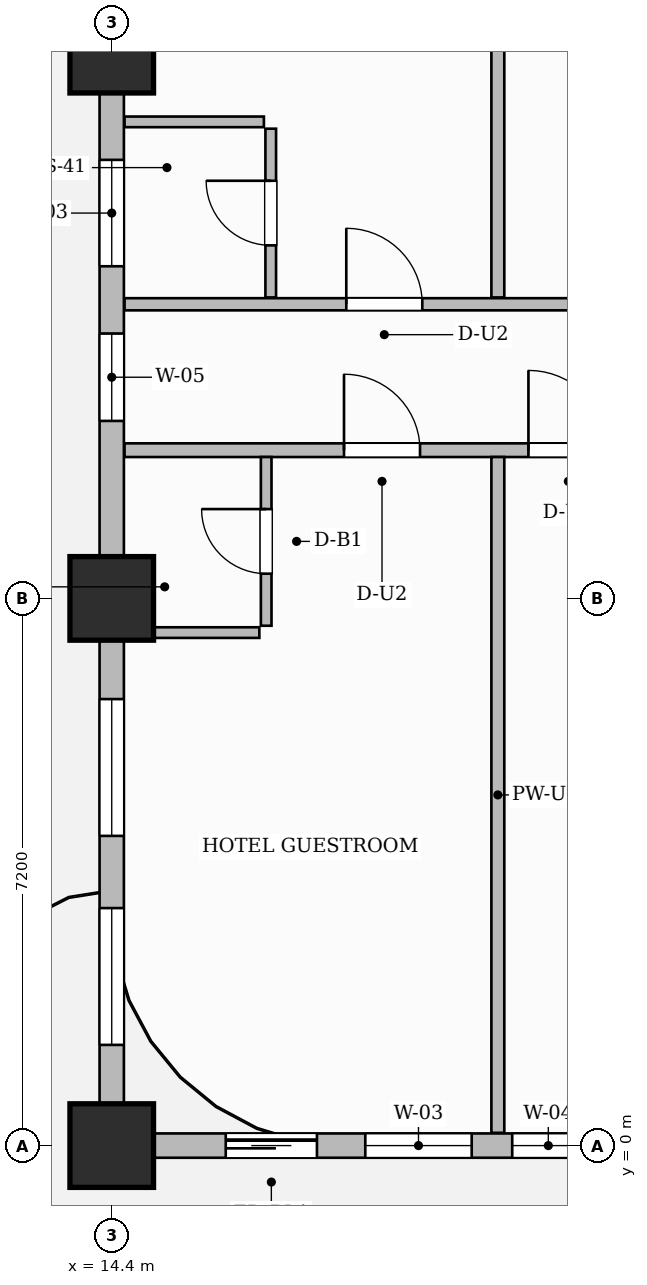
"""IFC4 building model, lengths in metres.
Left out: names, types, materials, properties, quantities, classifications, styles, units other than length and angle.
Written with IfcOpenShell. Run it as: python <this file> out.ifc"""

import sys

from ifc_helpers import new_model, si_unit, direction, frame, frame_2d, origin, origin_2d, place, context, subcontext, project, spatial, rectangle, extrude, source, transform, mapped, element, fill, save


model = new_model("IFC4")
c1 = context("Model", 3, precision=1e-05, world=origin(), true_north=direction((0.0, 1.0)))
c2 = subcontext(c1, "Body", "Model", "MODEL_VIEW")
j1 = project(units=[si_unit("LENGTHUNIT", "METRE"), si_unit("PLANEANGLEUNIT", "RADIAN")], contexts=[c1])
p1 = place(None, origin())
s1 = spatial("IfcSite", under=j1, at=p1, CompositionType="ELEMENT")
p2 = place(p1, origin())
s2 = spatial("IfcBuilding", under=s1, at=p2, CompositionType="ELEMENT")
p3 = place(p2, frame((0.0, 0.0, 32.4)))
s3 = spatial("IfcBuildingStorey", under=s2, at=p3, CompositionType="ELEMENT", Elevation=32.4)
m1 = source(origin(), c2, "Body", "SweptSolid", [
    extrude(rectangle(XDim=1.1, YDim=1.1, at=origin_2d()), origin(), (0.0, 0.0, 1.0), 3.7),
])
for number, where, z_axis, x_axis in (
    (1, (14.4, 0.0, 0.0), (0.0, 0.0, 1.0), (1.0, 0.0, 0.0)),
    (2, (14.4, 7.2, 0.0), (0.0, 0.0, 1.0), (1.0, 0.0, 0.0)),
    (3, (14.4, 14.4, 0.0), (0.0, 0.0, 1.0), (1.0, 0.0, 0.0)),
):
    element("IfcColumn", number, at=place(p3, frame(where, z_axis=z_axis, x_axis=x_axis)), inside=s3, PredefinedType="COLUMN", context=c2, shape_type="MappedRepresentation", body=[
        mapped(m1, transform((0.0, 0.0, 0.0), scale=1.0)),
    ])
p4 = place(p3, frame((14.568, 9.15, 0.0), z_axis=(0.0, 0.0, 1.0), x_axis=(1.0, 0.0, 0.0)))
e4 = element("IfcWall", 4, at=p4, inside=s3, PredefinedType="PARTITIONING", context=c2, shape_type="SweptSolid", body=[
    extrude(rectangle(XDim=15.542, YDim=0.18, at=frame_2d((7.771, 0.0))), origin(), (0.0, 0.0, 1.0), 3.45),
])
p5 = place(p4, frame((2.888, 0.0, 0.0)))
e5 = element("IfcOpeningElement", 5, at=p5, cuts=e4, PredefinedType="OPENING", context=c2, shape_type="SweptSolid", body=[
    extrude(rectangle(XDim=1.0, YDim=2.2, at=frame_2d((0.5, 1.1))), frame((0.0, 0.1, 0.0), z_axis=(0.0, -1.0, 0.0), x_axis=(1.0, 0.0, 0.0)), (0.0, 0.0, 1.0), 0.2),
])
p6 = place(p4, frame((5.314, 0.0, 0.0)))
e6 = element("IfcOpeningElement", 6, at=p6, cuts=e4, PredefinedType="OPENING", context=c2, shape_type="SweptSolid", body=[
    extrude(rectangle(XDim=1.05, YDim=2.25, at=frame_2d((0.525, 1.125))), frame((0.0, 0.1, 0.0), z_axis=(0.0, -1.0, 0.0), x_axis=(1.0, 0.0, 0.0)), (0.0, 0.0, 1.0), 0.2),
])
p7 = place(p4, frame((13.7, 0.0, 0.0)))
e7 = element("IfcOpeningElement", 7, at=p7, cuts=e4, PredefinedType="OPENING", context=c2, shape_type="SweptSolid", body=[
    extrude(rectangle(XDim=1.0, YDim=2.2, at=frame_2d((0.5, 1.1))), frame((0.0, 0.1, 0.0), z_axis=(0.0, -1.0, 0.0), x_axis=(1.0, 0.0, 0.0)), (0.0, 0.0, 1.0), 0.2),
])
p8 = place(p3, frame((14.568, 11.07, 0.0), z_axis=(0.0, 0.0, 1.0), x_axis=(1.0, 0.0, 0.0)))
e8 = element("IfcWall", 8, at=p8, inside=s3, PredefinedType="PARTITIONING", context=c2, shape_type="SweptSolid", body=[
    extrude(rectangle(XDim=15.542, YDim=0.16, at=frame_2d((7.771, 0.0))), origin(), (0.0, 0.0, 1.0), 3.45),
])
p9 = place(p8, frame((2.918, 0.0, 0.0)))
e9 = element("IfcOpeningElement", 9, at=p9, cuts=e8, PredefinedType="OPENING", context=c2, shape_type="SweptSolid", body=[
    extrude(rectangle(XDim=1.0, YDim=2.2, at=frame_2d((0.5, 1.1))), frame((0.0, 0.09, 0.0), z_axis=(0.0, -1.0, 0.0), x_axis=(1.0, 0.0, 0.0)), (0.0, 0.0, 1.0), 0.18),
])
p10 = place(p8, frame((6.647, 0.0, 0.0)))
e10 = element("IfcOpeningElement", 10, at=p10, cuts=e8, PredefinedType="OPENING", context=c2, shape_type="SweptSolid", body=[
    extrude(rectangle(XDim=1.05, YDim=2.25, at=frame_2d((0.525, 1.125))), frame((0.0, 0.09, 0.0), z_axis=(0.0, -1.0, 0.0), x_axis=(1.0, 0.0, 0.0)), (0.0, 0.0, 1.0), 0.18),
])
p11 = place(p3, frame((19.48, 0.168, 0.0), z_axis=(0.0, 0.0, 1.0), x_axis=(0.0, 1.0, 0.0)))
e11 = element("IfcWall", 11, at=p11, inside=s3, PredefinedType="PARTITIONING", context=c2, shape_type="SweptSolid", body=[
    extrude(rectangle(XDim=8.892, YDim=0.17, at=frame_2d((4.446, 0.0))), origin(), (0.0, 0.0, 1.0), 3.45),
])
p12 = place(p3, frame((16.432, 6.84, 0.0), z_axis=(0.0, 0.0, 1.0), x_axis=(0.0, 1.0, 0.0)))
e12 = element("IfcWall", 12, at=p12, inside=s3, PredefinedType="PARTITIONING", context=c2, shape_type="SweptSolid", body=[
    extrude(rectangle(XDim=2.22, YDim=0.14, at=frame_2d((1.11, 0.0))), origin(), (0.0, 0.0, 1.0), 3.45),
])
p13 = place(p12, frame((0.685, 0.0, 0.0)))
e13 = element("IfcOpeningElement", 13, at=p13, cuts=e12, PredefinedType="OPENING", context=c2, shape_type="SweptSolid", body=[
    extrude(rectangle(XDim=0.85, YDim=2.1, at=frame_2d((0.425, 1.05))), frame((0.0, 0.08, 0.0), z_axis=(0.0, -1.0, 0.0), x_axis=(1.0, 0.0, 0.0)), (0.0, 0.0, 1.0), 0.16),
])
p14 = place(p3, frame((14.49, 6.75, 0.0), z_axis=(0.0, 0.0, 1.0), x_axis=(1.0, 0.0, 0.0)))
e14 = element("IfcWall", 14, at=p14, inside=s3, PredefinedType="PARTITIONING", context=c2, shape_type="SweptSolid", body=[
    extrude(rectangle(XDim=1.852, YDim=0.14, at=frame_2d((0.926, 0.0))), origin(), (0.0, 0.0, 1.0), 3.45),
])
p15 = place(p3, frame((19.48, 11.16, 0.0), z_axis=(0.0, 0.0, 1.0), x_axis=(0.0, 1.0, 0.0)))
e15 = element("IfcWall", 15, at=p15, inside=s3, PredefinedType="PARTITIONING", context=c2, shape_type="SweptSolid", body=[
    extrude(rectangle(XDim=10.272, YDim=0.17, at=frame_2d((5.136, 0.0))), origin(), (0.0, 0.0, 1.0), 3.45),
])
p16 = place(p3, frame((16.492, 11.16, 0.0), z_axis=(0.0, 0.0, 1.0), x_axis=(0.0, 1.0, 0.0)))
e16 = element("IfcWall", 16, at=p16, inside=s3, PredefinedType="PARTITIONING", context=c2, shape_type="SweptSolid", body=[
    extrude(rectangle(XDim=2.22, YDim=0.14, at=frame_2d((1.11, 0.0))), origin(), (0.0, 0.0, 1.0), 3.45),
])
p17 = place(p16, frame((0.685, 0.0, 0.0)))
e17 = element("IfcOpeningElement", 17, at=p17, cuts=e16, PredefinedType="OPENING", context=c2, shape_type="SweptSolid", body=[
    extrude(rectangle(XDim=0.85, YDim=2.1, at=frame_2d((0.425, 1.05))), frame((0.0, 0.08, 0.0), z_axis=(0.0, -1.0, 0.0), x_axis=(1.0, 0.0, 0.0)), (0.0, 0.0, 1.0), 0.16),
])
p18 = place(p3, frame((14.568, 13.47, 0.0), z_axis=(0.0, 0.0, 1.0), x_axis=(1.0, 0.0, 0.0)))
e18 = element("IfcWall", 18, at=p18, inside=s3, PredefinedType="PARTITIONING", context=c2, shape_type="SweptSolid", body=[
    extrude(rectangle(XDim=1.834, YDim=0.14, at=frame_2d((0.917, 0.0))), origin(), (0.0, 0.0, 1.0), 3.45),
])
p19 = place(p3, frame((14.4, 0.0, 0.0), z_axis=(0.0, 0.0, 1.0), x_axis=(1.0, 0.0, 0.0)))
e19 = element("IfcWall", 19, at=p19, inside=s3, PredefinedType="SOLIDWALL", context=c2, shape_type="SweptSolid", body=[
    extrude(rectangle(XDim=43.2, YDim=0.32, at=frame_2d((21.6, 0.0))), origin(), (0.0, 0.0, 1.0), 2.885),
])
p20 = place(p19, frame((1.5, 0.0, 0.0)))
e20 = element("IfcOpeningElement", 20, at=p20, cuts=e19, PredefinedType="OPENING", context=c2, shape_type="SweptSolid", body=[
    extrude(rectangle(XDim=1.2, YDim=2.2, at=frame_2d((0.6, 1.1))), frame((0.0, 0.17, 0.0), z_axis=(0.0, -1.0, 0.0), x_axis=(1.0, 0.0, 0.0)), (0.0, 0.0, 1.0), 0.34),
])
p21 = place(p19, frame((3.336, 0.0, 0.8)))
e21 = element("IfcOpeningElement", 21, at=p21, cuts=e19, PredefinedType="OPENING", context=c2, shape_type="SweptSolid", body=[
    extrude(rectangle(XDim=1.4, YDim=1.85, at=frame_2d((0.7, 0.925))), frame((0.0, 0.17, 0.0), z_axis=(0.0, -1.0, 0.0), x_axis=(1.0, 0.0, 0.0)), (0.0, 0.0, 1.0), 0.34),
])
p22 = place(p19, frame((5.269, 0.0, 0.8)))
e22 = element("IfcOpeningElement", 22, at=p22, cuts=e19, PredefinedType="OPENING", context=c2, shape_type="SweptSolid", body=[
    extrude(rectangle(XDim=0.95, YDim=1.75, at=frame_2d((0.475, 0.875))), frame((0.0, 0.17, 0.0), z_axis=(0.0, -1.0, 0.0), x_axis=(1.0, 0.0, 0.0)), (0.0, 0.0, 1.0), 0.34),
])
p23 = place(p19, frame((8.389, 0.0, 0.8)))
e23 = element("IfcOpeningElement", 23, at=p23, cuts=e19, PredefinedType="OPENING", context=c2, shape_type="SweptSolid", body=[
    extrude(rectangle(XDim=1.8, YDim=1.85, at=frame_2d((0.9, 0.925))), frame((0.0, 0.17, 0.0), z_axis=(0.0, -1.0, 0.0), x_axis=(1.0, 0.0, 0.0)), (0.0, 0.0, 1.0), 0.34),
])
p24 = place(p19, frame((11.197, 0.0, 0.8)))
e24 = element("IfcOpeningElement", 24, at=p24, cuts=e19, PredefinedType="OPENING", context=c2, shape_type="SweptSolid", body=[
    extrude(rectangle(XDim=1.8, YDim=1.85, at=frame_2d((0.9, 0.925))), frame((0.0, 0.17, 0.0), z_axis=(0.0, -1.0, 0.0), x_axis=(1.0, 0.0, 0.0)), (0.0, 0.0, 1.0), 0.34),
])
p25 = place(p19, frame((16.804, 0.0, 0.8)))
e25 = element("IfcOpeningElement", 25, at=p25, cuts=e19, PredefinedType="OPENING", context=c2, shape_type="SweptSolid", body=[
    extrude(rectangle(XDim=1.8, YDim=1.85, at=frame_2d((0.9, 0.925))), frame((0.0, 0.17, 0.0), z_axis=(0.0, -1.0, 0.0), x_axis=(1.0, 0.0, 0.0)), (0.0, 0.0, 1.0), 0.34),
])
p26 = place(p19, frame((21.725, 0.0, 0.8)))
e26 = element("IfcOpeningElement", 26, at=p26, cuts=e19, PredefinedType="OPENING", context=c2, shape_type="SweptSolid", body=[
    extrude(rectangle(XDim=1.8, YDim=1.85, at=frame_2d((0.9, 0.925))), frame((0.0, 0.17, 0.0), z_axis=(0.0, -1.0, 0.0), x_axis=(1.0, 0.0, 0.0)), (0.0, 0.0, 1.0), 0.34),
])
p27 = place(p19, frame((24.475, 0.0, 0.8)))
e27 = element("IfcOpeningElement", 27, at=p27, cuts=e19, PredefinedType="OPENING", context=c2, shape_type="SweptSolid", body=[
    extrude(rectangle(XDim=1.8, YDim=1.85, at=frame_2d((0.9, 0.925))), frame((0.0, 0.17, 0.0), z_axis=(0.0, -1.0, 0.0), x_axis=(1.0, 0.0, 0.0)), (0.0, 0.0, 1.0), 0.34),
])
p28 = place(p19, frame((29.075, 0.0, 0.8)))
e28 = element("IfcOpeningElement", 28, at=p28, cuts=e19, PredefinedType="OPENING", context=c2, shape_type="SweptSolid", body=[
    extrude(rectangle(XDim=1.8, YDim=1.85, at=frame_2d((0.9, 0.925))), frame((0.0, 0.17, 0.0), z_axis=(0.0, -1.0, 0.0), x_axis=(1.0, 0.0, 0.0)), (0.0, 0.0, 1.0), 0.34),
])
p29 = place(p19, frame((32.125, 0.0, 0.8)))
e29 = element("IfcOpeningElement", 29, at=p29, cuts=e19, PredefinedType="OPENING", context=c2, shape_type="SweptSolid", body=[
    extrude(rectangle(XDim=1.8, YDim=1.85, at=frame_2d((0.9, 0.925))), frame((0.0, 0.17, 0.0), z_axis=(0.0, -1.0, 0.0), x_axis=(1.0, 0.0, 0.0)), (0.0, 0.0, 1.0), 0.34),
])
p30 = place(p19, frame((36.875, 0.0, 0.8)))
e30 = element("IfcOpeningElement", 30, at=p30, cuts=e19, PredefinedType="OPENING", context=c2, shape_type="SweptSolid", body=[
    extrude(rectangle(XDim=1.8, YDim=1.85, at=frame_2d((0.9, 0.925))), frame((0.0, 0.17, 0.0), z_axis=(0.0, -1.0, 0.0), x_axis=(1.0, 0.0, 0.0)), (0.0, 0.0, 1.0), 0.34),
])
p31 = place(p19, frame((39.925, 0.0, 0.8)))
e31 = element("IfcOpeningElement", 31, at=p31, cuts=e19, PredefinedType="OPENING", context=c2, shape_type="SweptSolid", body=[
    extrude(rectangle(XDim=1.8, YDim=1.85, at=frame_2d((0.9, 0.925))), frame((0.0, 0.17, 0.0), z_axis=(0.0, -1.0, 0.0), x_axis=(1.0, 0.0, 0.0)), (0.0, 0.0, 1.0), 0.34),
])
p32 = place(p3, frame((14.4, 0.05, 0.0), z_axis=(0.0, 0.0, 1.0), x_axis=(0.0, 1.0, 0.0)))
e32 = element("IfcWall", 32, at=p32, inside=s3, PredefinedType="SOLIDWALL", context=c2, shape_type="SweptSolid", body=[
    extrude(rectangle(XDim=21.5, YDim=0.32, at=frame_2d((10.75, 0.0))), origin(), (0.0, 0.0, 1.0), 2.885),
])
p33 = place(p32, frame((1.275, 0.0, 0.8)))
e33 = element("IfcOpeningElement", 33, at=p33, cuts=e32, PredefinedType="OPENING", context=c2, shape_type="SweptSolid", body=[
    extrude(rectangle(XDim=1.8, YDim=1.85, at=frame_2d((0.9, 0.925))), frame((0.0, 0.17, 0.0), z_axis=(0.0, -1.0, 0.0), x_axis=(1.0, 0.0, 0.0)), (0.0, 0.0, 1.0), 0.34),
])
p34 = place(p32, frame((4.025, 0.0, 0.8)))
e34 = element("IfcOpeningElement", 34, at=p34, cuts=e32, PredefinedType="OPENING", context=c2, shape_type="SweptSolid", body=[
    extrude(rectangle(XDim=1.8, YDim=1.85, at=frame_2d((0.9, 0.925))), frame((0.0, 0.17, 0.0), z_axis=(0.0, -1.0, 0.0), x_axis=(1.0, 0.0, 0.0)), (0.0, 0.0, 1.0), 0.34),
])
p35 = place(p32, frame((9.485, 0.0, 0.8)))
e35 = element("IfcOpeningElement", 35, at=p35, cuts=e32, PredefinedType="OPENING", context=c2, shape_type="SweptSolid", body=[
    extrude(rectangle(XDim=1.15, YDim=1.8, at=frame_2d((0.575, 0.9))), frame((0.0, 0.17, 0.0), z_axis=(0.0, -1.0, 0.0), x_axis=(1.0, 0.0, 0.0)), (0.0, 0.0, 1.0), 0.34),
])
p36 = place(p32, frame((11.52, 0.0, 0.8)))
e36 = element("IfcOpeningElement", 36, at=p36, cuts=e32, PredefinedType="OPENING", context=c2, shape_type="SweptSolid", body=[
    extrude(rectangle(XDim=1.4, YDim=1.85, at=frame_2d((0.7, 0.925))), frame((0.0, 0.17, 0.0), z_axis=(0.0, -1.0, 0.0), x_axis=(1.0, 0.0, 0.0)), (0.0, 0.0, 1.0), 0.34),
])
p37 = place(p32, frame((15.675, 0.0, 0.8)))
e37 = element("IfcOpeningElement", 37, at=p37, cuts=e32, PredefinedType="OPENING", context=c2, shape_type="SweptSolid", body=[
    extrude(rectangle(XDim=1.8, YDim=1.85, at=frame_2d((0.9, 0.925))), frame((0.0, 0.17, 0.0), z_axis=(0.0, -1.0, 0.0), x_axis=(1.0, 0.0, 0.0)), (0.0, 0.0, 1.0), 0.34),
])
p38 = place(p32, frame((18.425, 0.0, 0.8)))
e38 = element("IfcOpeningElement", 38, at=p38, cuts=e32, PredefinedType="OPENING", context=c2, shape_type="SweptSolid", body=[
    extrude(rectangle(XDim=1.8, YDim=1.85, at=frame_2d((0.9, 0.925))), frame((0.0, 0.17, 0.0), z_axis=(0.0, -1.0, 0.0), x_axis=(1.0, 0.0, 0.0)), (0.0, 0.0, 1.0), 0.34),
])
m2 = source(origin(), c2, "Body", "SweptSolid", [
    extrude(rectangle(XDim=0.85, YDim=2.1, at=frame_2d((0.425, 1.05))), frame((0.0, 0.025, 0.0), z_axis=(0.0, -1.0, 0.0), x_axis=(1.0, 0.0, 0.0)), (0.0, 0.0, 1.0), 0.05),
])
p39 = place(p13, origin())
e39 = element("IfcDoor", 39, at=p39, inside=s3, OperationType="SINGLE_SWING_RIGHT", PredefinedType="DOOR", context=c2, shape_type="MappedRepresentation", body=[
    mapped(m2, transform((0.0, 0.0, 0.0), scale=1.0)),
])
fill(e13, e39)
m3 = source(origin(), c2, "Body", "SweptSolid", [
    extrude(rectangle(XDim=1.0, YDim=2.2, at=frame_2d((0.5, 1.1))), frame((0.0, 0.025, 0.0), z_axis=(0.0, -1.0, 0.0), x_axis=(1.0, 0.0, 0.0)), (0.0, 0.0, 1.0), 0.05),
])
p40 = place(p5, origin())
e40 = element("IfcDoor", 40, at=p40, inside=s3, OperationType="SINGLE_SWING_LEFT", PredefinedType="DOOR", context=c2, shape_type="MappedRepresentation", body=[
    mapped(m3, transform((0.0, 0.0, 0.0), scale=1.0)),
])
fill(e5, e40)
m4 = source(origin(), c2, "Body", "SweptSolid", [
    extrude(rectangle(XDim=1.05, YDim=2.25, at=frame_2d((0.525, 1.125))), frame((0.0, 0.025, 0.0), z_axis=(0.0, -1.0, 0.0), x_axis=(1.0, 0.0, 0.0)), (0.0, 0.0, 1.0), 0.05),
])
p41 = place(p6, origin())
e41 = element("IfcDoor", 41, at=p41, inside=s3, OperationType="SINGLE_SWING_LEFT", PredefinedType="DOOR", context=c2, shape_type="MappedRepresentation", body=[
    mapped(m4, transform((0.0, 0.0, 0.0), scale=1.0)),
])
fill(e6, e41)
p42 = place(p17, origin())
e42 = element("IfcDoor", 42, at=p42, inside=s3, OperationType="SINGLE_SWING_RIGHT", PredefinedType="DOOR", context=c2, shape_type="MappedRepresentation", body=[
    mapped(m2, transform((0.0, 0.0, 0.0), scale=1.0)),
])
fill(e17, e42)
p43 = place(p9, origin())
e43 = element("IfcDoor", 43, at=p43, inside=s3, OperationType="SINGLE_SWING_LEFT", PredefinedType="DOOR", context=c2, shape_type="MappedRepresentation", body=[
    mapped(m3, transform((0.0, 0.0, 0.0), scale=1.0)),
])
fill(e9, e43)
m5 = source(origin(), c2, "Body", "SweptSolid", [
    extrude(rectangle(XDim=1.2, YDim=2.2, at=frame_2d((0.6, 1.1))), frame((0.0, 0.025, 0.0), z_axis=(0.0, -1.0, 0.0), x_axis=(1.0, 0.0, 0.0)), (0.0, 0.0, 1.0), 0.05),
])
p44 = place(p20, origin())
e44 = element("IfcDoor", 44, at=p44, inside=s3, OperationType="SLIDING_TO_LEFT", PredefinedType="DOOR", context=c2, shape_type="MappedRepresentation", body=[
    mapped(m5, transform((0.0, 0.0, 0.0), scale=1.0)),
])
fill(e20, e44)
m6 = source(origin(), c2, "Body", "SweptSolid", [
    extrude(rectangle(XDim=1.4, YDim=1.85, at=frame_2d((0.7, 0.925))), frame((0.0, 0.03, 0.0), z_axis=(0.0, -1.0, 0.0), x_axis=(1.0, 0.0, 0.0)), (0.0, 0.0, 1.0), 0.06),
])
p45 = place(p21, origin())
e45 = element("IfcWindow", 45, at=p45, inside=s3, PartitioningType="SINGLE_PANEL", PredefinedType="WINDOW", context=c2, shape_type="MappedRepresentation", body=[
    mapped(m6, transform((0.0, 0.0, 0.0), scale=1.0)),
])
fill(e21, e45)
m7 = source(origin(), c2, "Body", "SweptSolid", [
    extrude(rectangle(XDim=0.95, YDim=1.75, at=frame_2d((0.475, 0.875))), frame((0.0, 0.03, 0.0), z_axis=(0.0, -1.0, 0.0), x_axis=(1.0, 0.0, 0.0)), (0.0, 0.0, 1.0), 0.06),
])
p46 = place(p22, origin())
e46 = element("IfcWindow", 46, at=p46, inside=s3, PartitioningType="SINGLE_PANEL", PredefinedType="WINDOW", context=c2, shape_type="MappedRepresentation", body=[
    mapped(m7, transform((0.0, 0.0, 0.0), scale=1.0)),
])
fill(e22, e46)
m8 = source(origin(), c2, "Body", "SweptSolid", [
    extrude(rectangle(XDim=1.8, YDim=1.85, at=frame_2d((0.9, 0.925))), frame((0.0, 0.03, 0.0), z_axis=(0.0, -1.0, 0.0), x_axis=(1.0, 0.0, 0.0)), (0.0, 0.0, 1.0), 0.06),
])
p47 = place(p33, origin())
e47 = element("IfcWindow", 47, at=p47, inside=s3, PartitioningType="DOUBLE_PANEL_VERTICAL", PredefinedType="WINDOW", context=c2, shape_type="MappedRepresentation", body=[
    mapped(m8, transform((0.0, 0.0, 0.0), scale=1.0)),
])
fill(e33, e47)
p48 = place(p34, origin())
e48 = element("IfcWindow", 48, at=p48, inside=s3, PartitioningType="DOUBLE_PANEL_VERTICAL", PredefinedType="WINDOW", context=c2, shape_type="MappedRepresentation", body=[
    mapped(m8, transform((0.0, 0.0, 0.0), scale=1.0)),
])
fill(e34, e48)
m9 = source(origin(), c2, "Body", "SweptSolid", [
    extrude(rectangle(XDim=1.15, YDim=1.8, at=frame_2d((0.575, 0.9))), frame((0.0, 0.03, 0.0), z_axis=(0.0, -1.0, 0.0), x_axis=(1.0, 0.0, 0.0)), (0.0, 0.0, 1.0), 0.06),
])
p49 = place(p35, origin())
e49 = element("IfcWindow", 49, at=p49, inside=s3, PartitioningType="SINGLE_PANEL", PredefinedType="WINDOW", context=c2, shape_type="MappedRepresentation", body=[
    mapped(m9, transform((0.0, 0.0, 0.0), scale=1.0)),
])
fill(e35, e49)
p50 = place(p36, origin())
e50 = element("IfcWindow", 50, at=p50, inside=s3, PartitioningType="SINGLE_PANEL", PredefinedType="WINDOW", context=c2, shape_type="MappedRepresentation", body=[
    mapped(m6, transform((0.0, 0.0, 0.0), scale=1.0)),
])
fill(e36, e50)
save(model, sys.argv[1])
